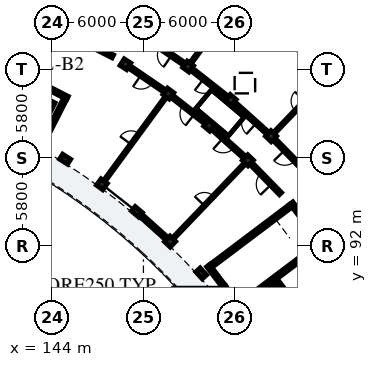
"""IFC4 building model, lengths in metres.
Left out: names, types, materials, properties, quantities, classifications, styles, units other than length and angle.
Written with IfcOpenShell. Run it as: python <this file> out.ifc"""

import sys

from ifc_helpers import new_model, si_unit, direction, frame, frame_2d, origin, origin_2d, place, context, subcontext, project, spatial, rectangle, extrude, element, fill, save


model = new_model("IFC4")
c1 = context("Model", 3, precision=1e-05, world=origin(), true_north=direction((0.0, 1.0)))
c2 = subcontext(c1, "Body", "Model", "MODEL_VIEW")
j1 = project(units=[si_unit("LENGTHUNIT", "METRE"), si_unit("PLANEANGLEUNIT", "RADIAN")], contexts=[c1])
p1 = place(None, origin())
s1 = spatial("IfcSite", under=j1, at=p1, CompositionType="ELEMENT")
p2 = place(p1, origin())
s2 = spatial("IfcBuilding", under=s1, at=p2, CompositionType="ELEMENT")
p3 = place(p2, frame((0.0, 0.0, 42.44)))
s3 = spatial("IfcBuildingStorey", under=s2, at=p3, CompositionType="ELEMENT", Elevation=42.44)
p4 = place(p3, frame((159.707, 94.658, 0.0), z_axis=(0.0, 0.0, 1.0), x_axis=(-0.798639633744, -0.601809550782, 0.0)))
e1 = element("IfcWall", 1, at=p4, inside=s3, PredefinedType="SHEAR", context=c2, shape_type="SweptSolid", body=[
    extrude(rectangle(XDim=6.6, YDim=0.25, at=frame_2d((3.3, 0.0))), origin(), (0.0, 0.0, 1.0), 3.11),
])
p5 = place(p3, frame((154.261, 90.711, 0.0), z_axis=(0.0, 0.0, 1.0), x_axis=(0.601825826579, -0.798627368967, 0.0)))
e2 = element("IfcWall", 2, at=p5, inside=s3, PredefinedType="SHEAR", context=c2, shape_type="SweptSolid", body=[
    extrude(rectangle(XDim=3.42, YDim=0.25, at=frame_2d((1.71, 0.0))), origin(), (0.0, 0.0, 1.0), 3.11),
])
p6 = place(p3, frame((159.731, 94.833, 0.0), z_axis=(0.0, 0.0, 1.0), x_axis=(0.601814606132, -0.798635824294, 0.0)))
e3 = element("IfcWall", 3, at=p6, inside=s3, PredefinedType="SHEAR", context=c2, shape_type="SweptSolid", body=[
    extrude(rectangle(XDim=3.42, YDim=0.25, at=frame_2d((1.71, 0.0))), origin(), (0.0, 0.0, 1.0), 3.11),
])
p7 = place(p3, frame((161.615, 92.126, 0.0), z_axis=(0.0, 0.0, 1.0), x_axis=(-0.798639633744, -0.601809550782, 0.0)))
e4 = element("IfcWall", 4, at=p7, inside=s3, PredefinedType="SHEAR", context=c2, shape_type="SweptSolid", body=[
    extrude(rectangle(XDim=6.6, YDim=0.25, at=frame_2d((3.3, 0.0))), origin(), (0.0, 0.0, 1.0), 3.11),
])
p8 = place(p7, frame((0.22, 0.0, 0.0)))
e5 = element("IfcOpeningElement", 5, at=p8, cuts=e4, PredefinedType="OPENING", context=c2, shape_type="SweptSolid", body=[
    extrude(rectangle(XDim=1.05, YDim=2.15, at=frame_2d((0.525, 1.075))), frame((0.0, 0.135, 0.0), z_axis=(0.0, -1.0, 0.0), x_axis=(1.0, 0.0, 0.0)), (0.0, 0.0, 1.0), 0.27),
])
p9 = place(p3, frame((158.827, 89.619, 0.0), z_axis=(0.0, 0.0, 1.0), x_axis=(0.601819781152, -0.798631924615, 0.0)))
e6 = element("IfcWall", 6, at=p9, inside=s3, PredefinedType="SHEAR", context=c2, shape_type="SweptSolid", body=[
    extrude(rectangle(XDim=3.26, YDim=0.23, at=frame_2d((1.63, 0.0))), origin(), (0.0, 0.0, 1.0), 3.11),
])
p10 = place(p9, frame((0.9, 0.0, 0.0)))
e7 = element("IfcOpeningElement", 7, at=p10, cuts=e6, PredefinedType="OPENING", context=c2, shape_type="SweptSolid", body=[
    extrude(rectangle(XDim=1.1, YDim=2.15, at=frame_2d((0.55, 1.075))), frame((0.0, 0.125, 0.0), z_axis=(0.0, -1.0, 0.0), x_axis=(1.0, 0.0, 0.0)), (0.0, 0.0, 1.0), 0.25),
])
p11 = place(p3, frame((158.805, 89.458, 0.0), z_axis=(0.0, 0.0, 1.0), x_axis=(-0.798608971494, -0.601850239387, 0.0)))
e8 = element("IfcWall", 8, at=p11, inside=s3, PredefinedType="SHEAR", context=c2, shape_type="SweptSolid", body=[
    extrude(rectangle(XDim=2.7, YDim=0.23, at=frame_2d((1.35, 0.0))), origin(), (0.0, 0.0, 1.0), 3.11),
])
p12 = place(p3, frame((142.103, 103.224, 0.0), z_axis=(0.0, 0.0, 1.0), x_axis=(0.891001200497, -0.454000947921, 0.0)))
e9 = element("IfcWall", 9, at=p12, inside=s3, PredefinedType="SHEAR", context=c2, shape_type="SweptSolid", body=[
    extrude(rectangle(XDim=3.26, YDim=0.23, at=frame_2d((1.63, 0.0))), origin(), (0.0, 0.0, 1.0), 3.11),
])
p13 = place(p12, frame((0.9, 0.0, 0.0)))
e10 = element("IfcOpeningElement", 10, at=p13, cuts=e9, PredefinedType="OPENING", context=c2, shape_type="SweptSolid", body=[
    extrude(rectangle(XDim=1.0, YDim=2.15, at=frame_2d((0.5, 1.075))), frame((0.0, 0.125, 0.0), z_axis=(0.0, -1.0, 0.0), x_axis=(1.0, 0.0, 0.0)), (0.0, 0.0, 1.0), 0.25),
])
p14 = place(p3, frame((144.853, 101.694, 0.0), z_axis=(0.0, 0.0, 1.0), x_axis=(-0.454036857101, -0.890982902414, 0.0)))
e11 = element("IfcWall", 11, at=p14, inside=s3, PredefinedType="SHEAR", context=c2, shape_type="SweptSolid", body=[
    extrude(rectangle(XDim=2.7, YDim=0.23, at=frame_2d((1.35, 0.0))), origin(), (0.0, 0.0, 1.0), 3.11),
])
p15 = place(p3, frame((153.801, 90.198, 0.0), z_axis=(0.0, 0.0, 1.0), x_axis=(0.73793204255, 0.674875025896, 0.0)))
e12 = element("IfcColumn", 12, at=p15, inside=s3, PredefinedType="PILASTER", context=c2, shape_type="SweptSolid", body=[
    extrude(rectangle(XDim=0.39, YDim=0.63, at=origin_2d()), origin(), (0.0, 0.0, 1.0), 3.1),
])
for number, where, z_axis, x_axis in (
    (13, (151.753, 92.294, 0.0), (0.0, 0.0, 1.0), (0.692, 0.722, 0.0)),
    (14, (156.873, 97.637, 0.0), (0.0, 0.0, 1.0), (0.692, 0.722, 0.0)),
    (15, (158.395, 99.226, 0.0), (0.0, 0.0, 1.0), (0.692, 0.722, 0.0)),
):
    element("IfcColumn", number, at=place(p3, frame(where, z_axis=z_axis, x_axis=x_axis)), inside=s3, PredefinedType="COLUMN", context=c2, shape_type="SweptSolid", body=[
        extrude(rectangle(XDim=0.52, YDim=0.52, at=origin_2d()), origin(), (0.0, 0.0, 1.0), 3.1),
    ])
p16 = place(p3, frame((149.572, 94.251, 0.0), z_axis=(0.0, 0.0, 1.0), x_axis=(0.642787582947, 0.766044465556, 0.0)))
e16 = element("IfcColumn", 16, at=p16, inside=s3, PredefinedType="PILASTER", context=c2, shape_type="SweptSolid", body=[
    extrude(rectangle(XDim=0.39, YDim=0.63, at=origin_2d()), origin(), (0.0, 0.0, 1.0), 3.1),
])
for number, where, z_axis, x_axis in (
    (17, (154.329, 99.919, 0.0), (0.0, 0.0, 1.0), (0.643, 0.766, 0.0)),
    (18, (155.743, 101.605, 0.0), (0.0, 0.0, 1.0), (0.643, 0.766, 0.0)),
    (19, (147.266, 96.059, 0.0), (0.0, 0.0, 1.0), (0.591, 0.807, 0.0)),
    (20, (151.639, 102.029, 0.0), (0.0, 0.0, 1.0), (0.591, 0.807, 0.0)),
    (21, (152.939, 103.804, 0.0), (0.0, 0.0, 1.0), (0.591, 0.807, 0.0)),
):
    element("IfcColumn", number, at=place(p3, frame(where, z_axis=z_axis, x_axis=x_axis)), inside=s3, PredefinedType="COLUMN", context=c2, shape_type="SweptSolid", body=[
        extrude(rectangle(XDim=0.52, YDim=0.52, at=origin_2d()), origin(), (0.0, 0.0, 1.0), 3.1),
    ])
p17 = place(p3, frame((144.847, 97.712, 0.0), z_axis=(0.0, 0.0, 1.0), x_axis=(0.536481544469, 0.843912052553, 0.0)))
e22 = element("IfcColumn", 22, at=p17, inside=s3, PredefinedType="PILASTER", context=c2, shape_type="SweptSolid", body=[
    extrude(rectangle(XDim=0.39, YDim=0.63, at=origin_2d()), origin(), (0.0, 0.0, 1.0), 3.1),
])
p18 = place(p3, frame((148.817, 103.957, 0.0), z_axis=(0.0, 0.0, 1.0), x_axis=(0.536481544469, 0.843912052553, 0.0)))
e23 = element("IfcColumn", 23, at=p18, inside=s3, PredefinedType="COLUMN", context=c2, shape_type="SweptSolid", body=[
    extrude(rectangle(XDim=0.52, YDim=0.52, at=origin_2d()), origin(), (0.0, 0.0, 1.0), 3.1),
])
p19 = place(p3, frame((162.029, 103.35, 0.0), z_axis=(0.0, 0.0, 1.0), x_axis=(-0.744441433528, 0.667687765386, 0.0)))
e24 = element("IfcWall", 24, at=p19, inside=s3, PredefinedType="SOLIDWALL", context=c2, shape_type="SweptSolid", body=[
    extrude(rectangle(XDim=3.531, YDim=0.22, at=frame_2d((1.765, 0.0))), origin(), (0.0, 0.0, 1.0), 2.355),
])
p20 = place(p19, frame((1.065, 0.0, 0.35)))
e25 = element("IfcOpeningElement", 25, at=p20, cuts=e24, PredefinedType="OPENING", context=c2, shape_type="SweptSolid", body=[
    extrude(rectangle(XDim=1.4, YDim=1.65, at=frame_2d((0.7, 0.825))), frame((0.0, 0.12, 0.0), z_axis=(0.0, -1.0, 0.0), x_axis=(1.0, 0.0, 0.0)), (0.0, 0.0, 1.0), 0.24),
])
p21 = place(p3, frame((151.582, 92.448, 0.0), z_axis=(0.0, 0.0, 1.0), x_axis=(-0.744394463736, 0.667740130859, 0.0)))
e26 = element("IfcWall", 26, at=p21, inside=s3, PredefinedType="SOLIDWALL", context=c2, shape_type="SweptSolid", body=[
    extrude(rectangle(XDim=2.535, YDim=0.22, at=frame_2d((1.268, 0.0))), origin(), (0.0, 0.0, 1.0), 2.355),
])
p22 = place(p21, frame((0.393, 0.0, 0.35)))
e27 = element("IfcOpeningElement", 27, at=p22, cuts=e26, PredefinedType="OPENING", context=c2, shape_type="SweptSolid", body=[
    extrude(rectangle(XDim=1.75, YDim=1.85, at=frame_2d((0.875, 0.925))), frame((0.0, 0.12, 0.0), z_axis=(0.0, -1.0, 0.0), x_axis=(1.0, 0.0, 0.0)), (0.0, 0.0, 1.0), 0.24),
])
p23 = place(p3, frame((143.625, 106.696, 0.0), z_axis=(0.0, 0.0, 1.0), x_axis=(0.891003372311, -0.453996685595, 0.0)))
e28 = element("IfcWall", 28, at=p23, inside=s3, PredefinedType="PARTITIONING", context=c2, shape_type="SweptSolid", body=[
    extrude(rectangle(XDim=4.9, YDim=0.22, at=frame_2d((2.45, 0.0))), origin(), (0.0, 0.0, 1.0), 2.34),
])
p24 = place(p23, frame((1.95, 0.0, 0.0)))
e29 = element("IfcOpeningElement", 29, at=p24, cuts=e28, PredefinedType="OPENING", context=c2, shape_type="SweptSolid", body=[
    extrude(rectangle(XDim=0.98, YDim=2.14, at=frame_2d((0.49, 1.07))), frame((0.0, 0.12, 0.0), z_axis=(0.0, -1.0, 0.0), x_axis=(1.0, 0.0, 0.0)), (0.0, 0.0, 1.0), 0.24),
])
p25 = place(p3, frame((160.641, 96.927, 0.0), z_axis=(0.0, 0.0, 1.0), x_axis=(-0.698787219683, 0.715329589496, 0.0)))
e30 = element("IfcWall", 30, at=p25, inside=s3, PredefinedType="PARTITIONING", context=c2, shape_type="SweptSolid", body=[
    extrude(rectangle(XDim=2.863, YDim=0.205, at=frame_2d((1.432, 0.0))), origin(), (0.0, 0.0, 1.0), 2.37),
])
p26 = place(p25, frame((0.937, 0.0, 0.0)))
e31 = element("IfcOpeningElement", 31, at=p26, cuts=e30, PredefinedType="OPENING", context=c2, shape_type="SweptSolid", body=[
    extrude(rectangle(XDim=0.99, YDim=2.16, at=frame_2d((0.495, 1.08))), frame((0.0, 0.113, 0.0), z_axis=(0.0, -1.0, 0.0), x_axis=(1.0, 0.0, 0.0)), (0.0, 0.0, 1.0), 0.225),
])
p27 = place(p3, frame((159.017, 95.443, 0.0), z_axis=(0.0, 0.0, 1.0), x_axis=(-0.698840007829, 0.715278018296, 0.0)))
e32 = element("IfcWall", 32, at=p27, inside=s3, PredefinedType="PARTITIONING", context=c2, shape_type="SweptSolid", body=[
    extrude(rectangle(XDim=2.718, YDim=0.205, at=frame_2d((1.359, 0.0))), origin(), (0.0, 0.0, 1.0), 2.37),
])
p28 = place(p27, frame((0.864, 0.0, 0.0)))
e33 = element("IfcOpeningElement", 33, at=p28, cuts=e32, PredefinedType="OPENING", context=c2, shape_type="SweptSolid", body=[
    extrude(rectangle(XDim=0.99, YDim=2.16, at=frame_2d((0.495, 1.08))), frame((0.0, 0.113, 0.0), z_axis=(0.0, -1.0, 0.0), x_axis=(1.0, 0.0, 0.0)), (0.0, 0.0, 1.0), 0.225),
])
p29 = place(p3, frame((158.672, 99.514, 0.0), z_axis=(0.0, 0.0, 1.0), x_axis=(0.691855720025, 0.722035776585, 0.0)))
e34 = element("IfcWall", 34, at=p29, inside=s3, PredefinedType="PARTITIONING", context=c2, shape_type="SweptSolid", body=[
    extrude(rectangle(XDim=4.7, YDim=0.125, at=frame_2d((2.35, 0.0))), origin(), (0.0, 0.0, 1.0), 2.37),
])
p30 = place(p29, frame((1.905, 0.0, 0.0)))
e35 = element("IfcOpeningElement", 35, at=p30, cuts=e34, PredefinedType="OPENING", context=c2, shape_type="SweptSolid", body=[
    extrude(rectangle(XDim=0.89, YDim=2.1, at=frame_2d((0.445, 1.05))), frame((0.0, 0.073, 0.0), z_axis=(0.0, -1.0, 0.0), x_axis=(1.0, 0.0, 0.0)), (0.0, 0.0, 1.0), 0.145),
])
p31 = place(p3, frame((152.03, 92.583, 0.0), z_axis=(0.0, 0.0, 1.0), x_axis=(0.691872422458, 0.722019771919, 0.0)))
e36 = element("IfcWall", 36, at=p31, inside=s3, PredefinedType="PARTITIONING", context=c2, shape_type="SweptSolid", body=[
    extrude(rectangle(XDim=6.6, YDim=0.125, at=frame_2d((3.3, 0.0))), origin(), (0.0, 0.0, 1.0), 2.37),
])
p32 = place(p31, frame((2.865, 0.0, 0.0)))
e37 = element("IfcOpeningElement", 37, at=p32, cuts=e36, PredefinedType="OPENING", context=c2, shape_type="SweptSolid", body=[
    extrude(rectangle(XDim=0.87, YDim=2.08, at=frame_2d((0.435, 1.04))), frame((0.0, 0.073, 0.0), z_axis=(0.0, -1.0, 0.0), x_axis=(1.0, 0.0, 0.0)), (0.0, 0.0, 1.0), 0.145),
])
p33 = place(p3, frame((158.135, 99.459, 0.0), z_axis=(0.0, 0.0, 1.0), x_axis=(-0.744433521088, 0.667696587291, 0.0)))
e38 = element("IfcWall", 38, at=p33, inside=s3, PredefinedType="PARTITIONING", context=c2, shape_type="SweptSolid", body=[
    extrude(rectangle(XDim=2.863, YDim=0.205, at=frame_2d((1.432, 0.0))), origin(), (0.0, 0.0, 1.0), 2.37),
])
p34 = place(p33, frame((0.947, 0.0, 0.0)))
e39 = element("IfcOpeningElement", 39, at=p34, cuts=e38, PredefinedType="OPENING", context=c2, shape_type="SweptSolid", body=[
    extrude(rectangle(XDim=0.97, YDim=2.15, at=frame_2d((0.485, 1.075))), frame((0.0, 0.113, 0.0), z_axis=(0.0, -1.0, 0.0), x_axis=(1.0, 0.0, 0.0)), (0.0, 0.0, 1.0), 0.225),
])
p35 = place(p3, frame((156.613, 97.871, 0.0), z_axis=(0.0, 0.0, 1.0), x_axis=(-0.744418559135, 0.667713268413, 0.0)))
e40 = element("IfcWall", 40, at=p35, inside=s3, PredefinedType="PARTITIONING", context=c2, shape_type="SweptSolid", body=[
    extrude(rectangle(XDim=2.718, YDim=0.205, at=frame_2d((1.359, 0.0))), origin(), (0.0, 0.0, 1.0), 2.37),
])
p36 = place(p35, frame((0.874, 0.0, 0.0)))
e41 = element("IfcOpeningElement", 41, at=p36, cuts=e40, PredefinedType="OPENING", context=c2, shape_type="SweptSolid", body=[
    extrude(rectangle(XDim=0.97, YDim=2.15, at=frame_2d((0.485, 1.075))), frame((0.0, 0.113, 0.0), z_axis=(0.0, -1.0, 0.0), x_axis=(1.0, 0.0, 0.0)), (0.0, 0.0, 1.0), 0.225),
])
p37 = place(p3, frame((155.467, 101.821, 0.0), z_axis=(0.0, 0.0, 1.0), x_axis=(-0.786806323554, 0.617199975061, 0.0)))
e42 = element("IfcWall", 42, at=p37, inside=s3, PredefinedType="PARTITIONING", context=c2, shape_type="SweptSolid", body=[
    extrude(rectangle(XDim=2.863, YDim=0.205, at=frame_2d((1.432, 0.0))), origin(), (0.0, 0.0, 1.0), 2.37),
])
p38 = place(p37, frame((0.957, 0.0, 0.0)))
e43 = element("IfcOpeningElement", 43, at=p38, cuts=e42, PredefinedType="OPENING", context=c2, shape_type="SweptSolid", body=[
    extrude(rectangle(XDim=0.95, YDim=2.13, at=frame_2d((0.475, 1.065))), frame((0.0, 0.113, 0.0), z_axis=(0.0, -1.0, 0.0), x_axis=(1.0, 0.0, 0.0)), (0.0, 0.0, 1.0), 0.225),
])
p39 = place(p3, frame((154.053, 100.135, 0.0), z_axis=(0.0, 0.0, 1.0), x_axis=(-0.786835457019, 0.617162833924, 0.0)))
e44 = element("IfcWall", 44, at=p39, inside=s3, PredefinedType="PARTITIONING", context=c2, shape_type="SweptSolid", body=[
    extrude(rectangle(XDim=2.718, YDim=0.205, at=frame_2d((1.359, 0.0))), origin(), (0.0, 0.0, 1.0), 2.37),
])
p40 = place(p39, frame((0.884, 0.0, 0.0)))
e45 = element("IfcOpeningElement", 45, at=p40, cuts=e44, PredefinedType="OPENING", context=c2, shape_type="SweptSolid", body=[
    extrude(rectangle(XDim=0.95, YDim=2.13, at=frame_2d((0.475, 1.065))), frame((0.0, 0.113, 0.0), z_axis=(0.0, -1.0, 0.0), x_axis=(1.0, 0.0, 0.0)), (0.0, 0.0, 1.0), 0.225),
])
p41 = place(p3, frame((153.176, 104.126, 0.0), z_axis=(0.0, 0.0, 1.0), x_axis=(0.590910940129, 0.806736797745, 0.0)))
e46 = element("IfcWall", 46, at=p41, inside=s3, PredefinedType="PARTITIONING", context=c2, shape_type="SweptSolid", body=[
    extrude(rectangle(XDim=4.7, YDim=0.125, at=frame_2d((2.35, 0.0))), origin(), (0.0, 0.0, 1.0), 2.37),
])
p42 = place(p41, frame((1.895, 0.0, 0.0)))
e47 = element("IfcOpeningElement", 47, at=p42, cuts=e46, PredefinedType="OPENING", context=c2, shape_type="SweptSolid", body=[
    extrude(rectangle(XDim=0.91, YDim=2.1, at=frame_2d((0.455, 1.05))), frame((0.0, 0.073, 0.0), z_axis=(0.0, -1.0, 0.0), x_axis=(1.0, 0.0, 0.0)), (0.0, 0.0, 1.0), 0.145),
])
p43 = place(p3, frame((147.503, 96.382, 0.0), z_axis=(0.0, 0.0, 1.0), x_axis=(0.590924179316, 0.806727100263, 0.0)))
e48 = element("IfcWall", 48, at=p43, inside=s3, PredefinedType="PARTITIONING", context=c2, shape_type="SweptSolid", body=[
    extrude(rectangle(XDim=6.6, YDim=0.125, at=frame_2d((3.3, 0.0))), origin(), (0.0, 0.0, 1.0), 2.37),
])
p44 = place(p43, frame((2.855, 0.0, 0.0)))
e49 = element("IfcOpeningElement", 49, at=p44, cuts=e48, PredefinedType="OPENING", context=c2, shape_type="SweptSolid", body=[
    extrude(rectangle(XDim=0.89, YDim=2.1, at=frame_2d((0.445, 1.05))), frame((0.0, 0.073, 0.0), z_axis=(0.0, -1.0, 0.0), x_axis=(1.0, 0.0, 0.0)), (0.0, 0.0, 1.0), 0.145),
])
p45 = place(p3, frame((152.65, 104.001, 0.0), z_axis=(0.0, 0.0, 1.0), x_axis=(-0.825779671787, 0.563992848947, 0.0)))
e50 = element("IfcWall", 50, at=p45, inside=s3, PredefinedType="PARTITIONING", context=c2, shape_type="SweptSolid", body=[
    extrude(rectangle(XDim=2.863, YDim=0.205, at=frame_2d((1.432, 0.0))), origin(), (0.0, 0.0, 1.0), 2.37),
])
p46 = place(p45, frame((0.967, 0.0, 0.0)))
e51 = element("IfcOpeningElement", 51, at=p46, cuts=e50, PredefinedType="OPENING", context=c2, shape_type="SweptSolid", body=[
    extrude(rectangle(XDim=0.93, YDim=2.12, at=frame_2d((0.465, 1.06))), frame((0.0, 0.113, 0.0), z_axis=(0.0, -1.0, 0.0), x_axis=(1.0, 0.0, 0.0)), (0.0, 0.0, 1.0), 0.225),
])
p47 = place(p3, frame((151.35, 102.226, 0.0), z_axis=(0.0, 0.0, 1.0), x_axis=(-0.825752009056, 0.56403334967, 0.0)))
e52 = element("IfcWall", 52, at=p47, inside=s3, PredefinedType="PARTITIONING", context=c2, shape_type="SweptSolid", body=[
    extrude(rectangle(XDim=2.718, YDim=0.205, at=frame_2d((1.359, 0.0))), origin(), (0.0, 0.0, 1.0), 2.37),
])
p48 = place(p47, frame((0.894, 0.0, 0.0)))
e53 = element("IfcOpeningElement", 53, at=p48, cuts=e52, PredefinedType="OPENING", context=c2, shape_type="SweptSolid", body=[
    extrude(rectangle(XDim=0.93, YDim=2.12, at=frame_2d((0.465, 1.06))), frame((0.0, 0.113, 0.0), z_axis=(0.0, -1.0, 0.0), x_axis=(1.0, 0.0, 0.0)), (0.0, 0.0, 1.0), 0.225),
])
p49 = place(p22, origin())
e54 = element("IfcWindow", 54, at=p49, inside=s3, PartitioningType="SINGLE_PANEL", PredefinedType="WINDOW", context=c2, shape_type="SweptSolid", body=[
    extrude(rectangle(XDim=1.75, YDim=1.85, at=frame_2d((0.875, 0.925))), frame((0.0, 0.03, 0.0), z_axis=(0.0, -1.0, 0.0), x_axis=(1.0, 0.0, 0.0)), (0.0, 0.0, 1.0), 0.06),
])
fill(e27, e54)
p50 = place(p2, frame((0.0, 0.0, 45.8)))
p51 = place(p50, frame((0.0, 0.0, -0.26)))
p52 = place(p51, frame((156.675, 102.716, 0.21)))
e55 = element("IfcWindow", 55, at=p52, inside=s3, PartitioningType="SINGLE_PANEL", PredefinedType="SKYLIGHT", context=c2, shape_type="SweptSolid", body=[
    extrude(rectangle(XDim=1.35, YDim=1.35, at=origin_2d()), origin(), (0.0, 0.0, 1.0), 0.05),
])
p53 = place(p26, origin())
e56 = element("IfcDoor", 56, at=p53, inside=s3, OperationType="SINGLE_SWING_RIGHT", PredefinedType="DOOR", context=c2, shape_type="SweptSolid", body=[
    extrude(rectangle(XDim=0.99, YDim=2.16, at=frame_2d((0.495, 1.08))), frame((0.0, 0.025, 0.0), z_axis=(0.0, -1.0, 0.0), x_axis=(1.0, 0.0, 0.0)), (0.0, 0.0, 1.0), 0.05),
])
fill(e31, e56)
p54 = place(p28, origin())
e57 = element("IfcDoor", 57, at=p54, inside=s3, OperationType="SINGLE_SWING_LEFT", PredefinedType="DOOR", context=c2, shape_type="SweptSolid", body=[
    extrude(rectangle(XDim=0.99, YDim=2.16, at=frame_2d((0.495, 1.08))), frame((0.0, 0.025, 0.0), z_axis=(0.0, -1.0, 0.0), x_axis=(1.0, 0.0, 0.0)), (0.0, 0.0, 1.0), 0.05),
])
fill(e33, e57)
p55 = place(p30, origin())
e58 = element("IfcDoor", 58, at=p55, inside=s3, OperationType="SINGLE_SWING_RIGHT", PredefinedType="DOOR", context=c2, shape_type="SweptSolid", body=[
    extrude(rectangle(XDim=0.89, YDim=2.1, at=frame_2d((0.445, 1.05))), frame((0.0, 0.025, 0.0), z_axis=(0.0, -1.0, 0.0), x_axis=(1.0, 0.0, 0.0)), (0.0, 0.0, 1.0), 0.05),
])
fill(e35, e58)
p56 = place(p32, origin())
e59 = element("IfcDoor", 59, at=p56, inside=s3, OperationType="SINGLE_SWING_LEFT", PredefinedType="DOOR", context=c2, shape_type="SweptSolid", body=[
    extrude(rectangle(XDim=0.87, YDim=2.08, at=frame_2d((0.435, 1.04))), frame((0.0, 0.025, 0.0), z_axis=(0.0, -1.0, 0.0), x_axis=(1.0, 0.0, 0.0)), (0.0, 0.0, 1.0), 0.05),
])
fill(e37, e59)
p57 = place(p34, origin())
e60 = element("IfcDoor", 60, at=p57, inside=s3, OperationType="SINGLE_SWING_LEFT", PredefinedType="DOOR", context=c2, shape_type="SweptSolid", body=[
    extrude(rectangle(XDim=0.97, YDim=2.15, at=frame_2d((0.485, 1.075))), frame((0.0, 0.025, 0.0), z_axis=(0.0, -1.0, 0.0), x_axis=(1.0, 0.0, 0.0)), (0.0, 0.0, 1.0), 0.05),
])
fill(e39, e60)
p58 = place(p36, origin())
e61 = element("IfcDoor", 61, at=p58, inside=s3, OperationType="SINGLE_SWING_RIGHT", PredefinedType="DOOR", context=c2, shape_type="SweptSolid", body=[
    extrude(rectangle(XDim=0.97, YDim=2.15, at=frame_2d((0.485, 1.075))), frame((0.0, 0.025, 0.0), z_axis=(0.0, -1.0, 0.0), x_axis=(1.0, 0.0, 0.0)), (0.0, 0.0, 1.0), 0.05),
])
fill(e41, e61)
p59 = place(p38, origin())
e62 = element("IfcDoor", 62, at=p59, inside=s3, OperationType="SINGLE_SWING_RIGHT", PredefinedType="DOOR", context=c2, shape_type="SweptSolid", body=[
    extrude(rectangle(XDim=0.95, YDim=2.13, at=frame_2d((0.475, 1.065))), frame((0.0, 0.025, 0.0), z_axis=(0.0, -1.0, 0.0), x_axis=(1.0, 0.0, 0.0)), (0.0, 0.0, 1.0), 0.05),
])
fill(e43, e62)
p60 = place(p40, origin())
e63 = element("IfcDoor", 63, at=p60, inside=s3, OperationType="SINGLE_SWING_LEFT", PredefinedType="DOOR", context=c2, shape_type="SweptSolid", body=[
    extrude(rectangle(XDim=0.95, YDim=2.13, at=frame_2d((0.475, 1.065))), frame((0.0, 0.025, 0.0), z_axis=(0.0, -1.0, 0.0), x_axis=(1.0, 0.0, 0.0)), (0.0, 0.0, 1.0), 0.05),
])
fill(e45, e63)
p61 = place(p44, origin())
e64 = element("IfcDoor", 64, at=p61, inside=s3, OperationType="SINGLE_SWING_LEFT", PredefinedType="DOOR", context=c2, shape_type="SweptSolid", body=[
    extrude(rectangle(XDim=0.89, YDim=2.1, at=frame_2d((0.445, 1.05))), frame((0.0, 0.025, 0.0), z_axis=(0.0, -1.0, 0.0), x_axis=(1.0, 0.0, 0.0)), (0.0, 0.0, 1.0), 0.05),
])
fill(e49, e64)
p62 = place(p46, origin())
e65 = element("IfcDoor", 65, at=p62, inside=s3, OperationType="SINGLE_SWING_LEFT", PredefinedType="DOOR", context=c2, shape_type="SweptSolid", body=[
    extrude(rectangle(XDim=0.93, YDim=2.12, at=frame_2d((0.465, 1.06))), frame((0.0, 0.025, 0.0), z_axis=(0.0, -1.0, 0.0), x_axis=(1.0, 0.0, 0.0)), (0.0, 0.0, 1.0), 0.05),
])
fill(e51, e65)
p63 = place(p48, origin())
e66 = element("IfcDoor", 66, at=p63, inside=s3, OperationType="SINGLE_SWING_RIGHT", PredefinedType="DOOR", context=c2, shape_type="SweptSolid", body=[
    extrude(rectangle(XDim=0.93, YDim=2.12, at=frame_2d((0.465, 1.06))), frame((0.0, 0.025, 0.0), z_axis=(0.0, -1.0, 0.0), x_axis=(1.0, 0.0, 0.0)), (0.0, 0.0, 1.0), 0.05),
])
fill(e53, e66)
save(model, sys.argv[1])
